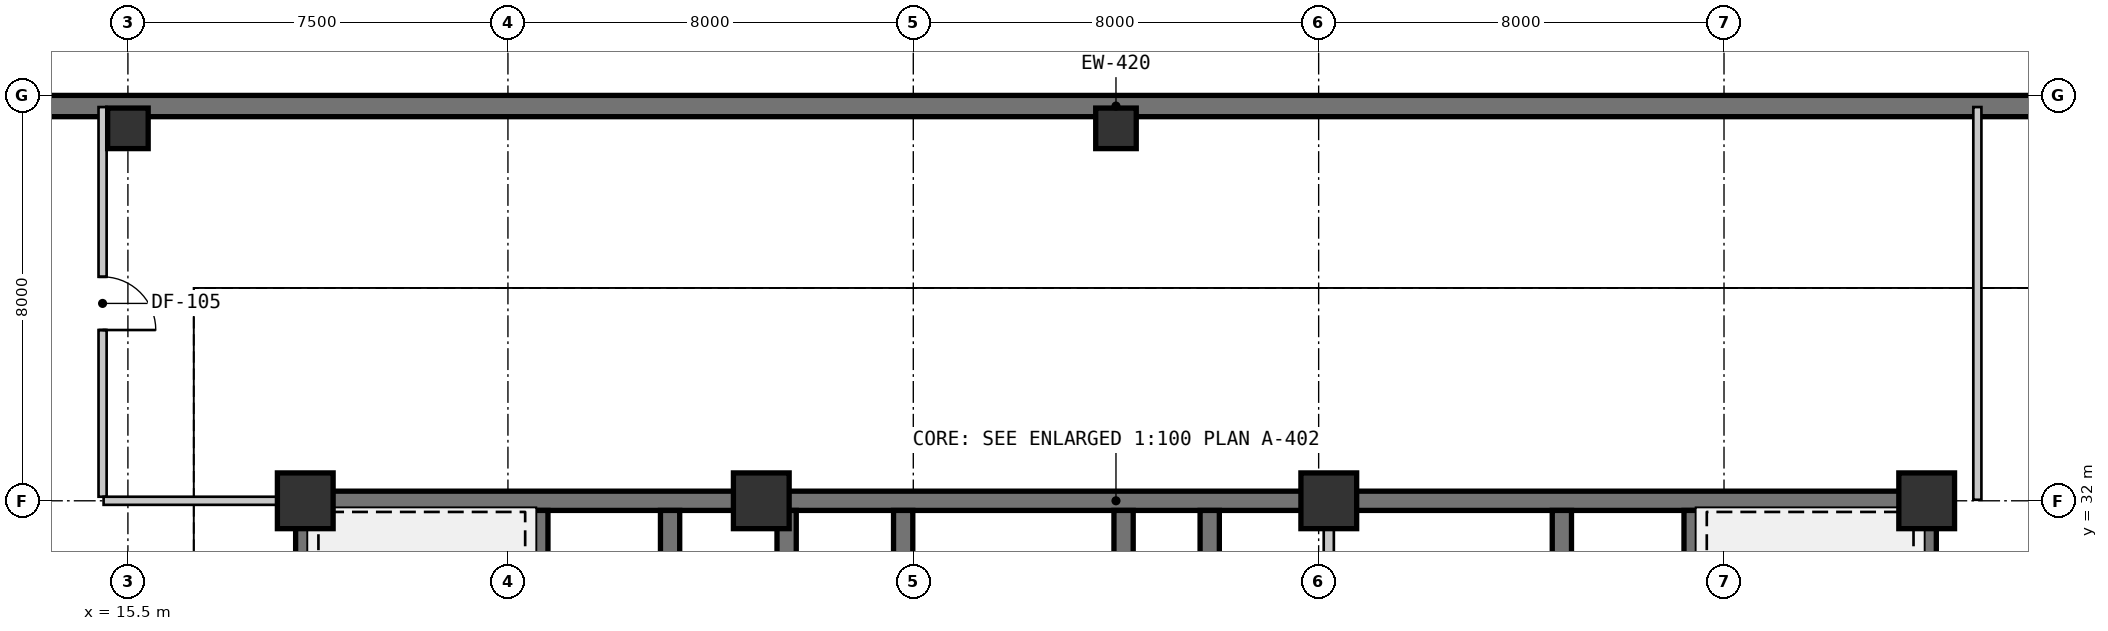
"""IFC4 building model, lengths in metres.
Left out: names, types, materials, properties, quantities, classifications, styles, units other than length and angle.
Written with IfcOpenShell. Run it as: python <this file> out.ifc"""

import sys

from ifc_helpers import new_model, si_unit, direction, frame, frame_2d, origin, origin_2d, place, context, subcontext, project, spatial, rectangle, extrude, source, transform, mapped, element, fill, save


model = new_model("IFC4")
c1 = context("Model", 3, precision=1e-05, world=origin(), true_north=direction((0.0, 1.0)))
c2 = subcontext(c1, "Body", "Model", "MODEL_VIEW")
j1 = project(units=[si_unit("LENGTHUNIT", "METRE"), si_unit("PLANEANGLEUNIT", "RADIAN")], contexts=[c1])
p1 = place(None, origin())
s1 = spatial("IfcSite", under=j1, at=p1, CompositionType="ELEMENT")
p2 = place(p1, origin())
s2 = spatial("IfcBuilding", under=s1, at=p2, CompositionType="ELEMENT")
p3 = place(p2, frame((0.0, 0.0, -8.0)))
s3 = spatial("IfcBuildingStorey", under=s2, at=p3, CompositionType="ELEMENT", Elevation=-8.0)
m1 = source(origin(), c2, "Body", "SweptSolid", [
    extrude(rectangle(XDim=1.1, YDim=1.1, at=origin_2d()), origin(), (0.0, 0.0, 1.0), 4.0),
])
for number, where, z_axis, x_axis in (
    (1, (19.0, 32.0, 0.0), (0.0, 0.0, 1.0), (1.0, 0.0, 0.0)),
    (2, (28.0, 32.0, 0.0), (0.0, 0.0, 1.0), (1.0, 0.0, 0.0)),
    (3, (39.2, 32.0, 0.0), (0.0, 0.0, 1.0), (1.0, 0.0, 0.0)),
    (4, (51.0, 32.0, 0.0), (0.0, 0.0, 1.0), (1.0, 0.0, 0.0)),
):
    element("IfcColumn", number, at=place(p3, frame(where, z_axis=z_axis, x_axis=x_axis)), inside=s3, PredefinedType="COLUMN", context=c2, shape_type="MappedRepresentation", body=[
        mapped(m1, transform((0.0, 0.0, 0.0), scale=1.0)),
    ])
m2 = source(origin(), c2, "Body", "SweptSolid", [
    extrude(rectangle(XDim=0.8, YDim=0.8, at=origin_2d()), origin(), (0.0, 0.0, 1.0), 4.0),
])
for number, where, z_axis, x_axis in (
    (5, (15.5, 39.35, 0.0), (0.0, 0.0, 1.0), (1.0, 0.0, 0.0)),
    (6, (35.0, 39.35, 0.0), (0.0, 0.0, 1.0), (1.0, 0.0, 0.0)),
):
    element("IfcColumn", number, at=place(p3, frame(where, z_axis=z_axis, x_axis=x_axis)), inside=s3, PredefinedType="COLUMN", context=c2, shape_type="MappedRepresentation", body=[
        mapped(m2, transform((0.0, 0.0, 0.0), scale=1.0)),
    ])
m3 = source(origin(), c2, "Body", "SweptSolid", [
    extrude(rectangle(XDim=69.58, YDim=0.42, at=frame_2d((34.79, 0.0))), origin(), (0.0, 0.0, 1.0), 3.72),
])
p4 = place(p3, frame((69.79, 39.79, 0.0), z_axis=(0.0, 0.0, 1.0), x_axis=(-1.0, 0.0, 0.0)))
e7 = element("IfcWall", 7, at=p4, inside=s3, PredefinedType="SOLIDWALL", context=c2, shape_type="MappedRepresentation", body=[
    mapped(m3, transform((0.0, 0.0, 0.0), scale=1.0)),
])
m4 = source(origin(), c2, "Body", "SweptSolid", [
    extrude(rectangle(XDim=9.19, YDim=0.38, at=frame_2d((4.595, 0.0))), origin(), (0.0, 0.0, 1.0), 3.72),
])
p5 = place(p3, frame((18.81, 32.0, 0.0), z_axis=(0.0, 0.0, 1.0), x_axis=(1.0, 0.0, 0.0)))
e8 = element("IfcWall", 8, at=p5, inside=s3, PredefinedType="SHEAR", context=c2, shape_type="MappedRepresentation", body=[
    mapped(m4, transform((0.0, 0.0, 0.0), scale=1.0)),
])
m5 = source(origin(), c2, "Body", "SweptSolid", [
    extrude(rectangle(XDim=11.2, YDim=0.38, at=frame_2d((5.6, 0.0))), origin(), (0.0, 0.0, 1.0), 3.72),
])
p6 = place(p3, frame((28.0, 32.0, 0.0), z_axis=(0.0, 0.0, 1.0), x_axis=(1.0, 0.0, 0.0)))
e9 = element("IfcWall", 9, at=p6, inside=s3, PredefinedType="SHEAR", context=c2, shape_type="MappedRepresentation", body=[
    mapped(m5, transform((0.0, 0.0, 0.0), scale=1.0)),
])
m6 = source(origin(), c2, "Body", "SweptSolid", [
    extrude(rectangle(XDim=11.99, YDim=0.38, at=frame_2d((5.995, 0.0))), origin(), (0.0, 0.0, 1.0), 3.72),
])
p7 = place(p3, frame((39.2, 32.0, 0.0), z_axis=(0.0, 0.0, 1.0), x_axis=(1.0, 0.0, 0.0)))
e10 = element("IfcWall", 10, at=p7, inside=s3, PredefinedType="SHEAR", context=c2, shape_type="MappedRepresentation", body=[
    mapped(m6, transform((0.0, 0.0, 0.0), scale=1.0)),
])
m7 = source(origin(), c2, "Body", "SweptSolid", [
    extrude(rectangle(XDim=3.61, YDim=0.38, at=frame_2d((1.805, 0.0))), origin(), (0.0, 0.0, 1.0), 3.72),
])
for number, where, z_axis, x_axis in (
    (11, (19.0, 28.2, 0.0), (0.0, 0.0, 1.0), (0.0, 1.0, 0.0)),
    (12, (51.0, 28.2, 0.0), (0.0, 0.0, 1.0), (0.0, 1.0, 0.0)),
):
    element("IfcWall", number, at=place(p3, frame(where, z_axis=z_axis, x_axis=x_axis)), inside=s3, PredefinedType="SHEAR", context=c2, shape_type="MappedRepresentation", body=[
        mapped(m7, transform((0.0, 0.0, 0.0), scale=1.0)),
    ])
m8 = source(origin(), c2, "Body", "SweptSolid", [
    extrude(rectangle(XDim=3.42, YDim=0.38, at=frame_2d((1.71, 0.0))), origin(), (0.0, 0.0, 1.0), 3.72),
])
for number, where, z_axis, x_axis in (
    (13, (23.6, 28.39, 0.0), (0.0, 0.0, 1.0), (0.0, 1.0, 0.0)),
    (14, (26.2, 28.39, 0.0), (0.0, 0.0, 1.0), (0.0, 1.0, 0.0)),
    (15, (46.4, 31.81, 0.0), (0.0, 0.0, 1.0), (0.0, -1.0, 0.0)),
    (16, (43.8, 31.81, 0.0), (0.0, 0.0, 1.0), (0.0, -1.0, 0.0)),
):
    element("IfcWall", number, at=place(p3, frame(where, z_axis=z_axis, x_axis=x_axis)), inside=s3, PredefinedType="SHEAR", context=c2, shape_type="MappedRepresentation", body=[
        mapped(m8, transform((0.0, 0.0, 0.0), scale=1.0)),
    ])
m9 = source(origin(), c2, "Body", "SweptSolid", [
    extrude(rectangle(XDim=1.12, YDim=0.38, at=frame_2d((0.56, 0.0))), origin(), (0.0, 0.0, 1.0), 3.72),
])
for number, where, z_axis, x_axis in (
    (17, (35.15, 31.81, 0.0), (0.0, 0.0, 1.0), (0.0, -1.0, 0.0)),
    (18, (36.85, 30.69, 0.0), (0.0, 0.0, 1.0), (0.0, 1.0, 0.0)),
):
    element("IfcWall", number, at=place(p3, frame(where, z_axis=z_axis, x_axis=x_axis)), inside=s3, PredefinedType="SHEAR", context=c2, shape_type="MappedRepresentation", body=[
        mapped(m9, transform((0.0, 0.0, 0.0), scale=1.0)),
    ])
for number, where, z_axis, x_axis in (
    (19, (28.5, 28.39, 0.0), (0.0, 0.0, 1.0), (0.0, 1.0, 0.0)),
    (20, (30.8, 28.39, 0.0), (0.0, 0.0, 1.0), (0.0, 1.0, 0.0)),
):
    element("IfcWall", number, at=place(p3, frame(where, z_axis=z_axis, x_axis=x_axis)), inside=s3, PredefinedType="SHEAR", context=c2, shape_type="MappedRepresentation", body=[
        mapped(m8, transform((0.0, 0.0, 0.0), scale=1.0)),
    ])
m10 = source(origin(), c2, "Body", "SweptSolid", [
    extrude(rectangle(XDim=7.71, YDim=0.2, at=frame_2d((3.855, 0.0))), origin(), (0.0, 0.0, 1.0), 3.26),
])
p8 = place(p3, frame((39.2, 31.81, 0.0), z_axis=(0.0, 0.0, 1.0), x_axis=(0.0, -1.0, 0.0)))
e21 = element("IfcWall", 21, at=p8, inside=s3, PredefinedType="SOLIDWALL", context=c2, shape_type="MappedRepresentation", body=[
    mapped(m10, transform((0.0, 0.0, 0.0), scale=1.0)),
])
m11 = source(origin(), c2, "Body", "SweptSolid", [
    extrude(rectangle(XDim=7.69, YDim=0.16, at=frame_2d((3.845, 0.0))), origin(), (0.0, 0.0, 1.0), 3.72),
])
p9 = place(p3, frame((15.0, 39.77, 0.0), z_axis=(0.0, 0.0, 1.0), x_axis=(0.0, -1.0, 0.0)))
e22 = element("IfcWall", 22, at=p9, inside=s3, PredefinedType="PARTITIONING", context=c2, shape_type="MappedRepresentation", body=[
    mapped(m11, transform((0.0, 0.0, 0.0), scale=1.0)),
])
m12 = source(origin(), c2, "Body", "SweptSolid", [
    extrude(rectangle(XDim=1.05, YDim=2.1, at=frame_2d((0.525, 1.05))), frame((0.0, 0.09, 0.0), z_axis=(0.0, -1.0, 0.0), x_axis=(1.0, 0.0, 0.0)), (0.0, 0.0, 1.0), 0.18),
])
p10 = place(p9, frame((3.35, 0.0, 0.0)))
e23 = element("IfcOpeningElement", 23, at=p10, cuts=e22, PredefinedType="OPENING", context=c2, shape_type="MappedRepresentation", body=[
    mapped(m12, transform((0.0, 0.0, 0.0), scale=1.0)),
])
m13 = source(origin(), c2, "Body", "SweptSolid", [
    extrude(rectangle(XDim=3.79, YDim=0.16, at=frame_2d((1.895, 0.0))), origin(), (0.0, 0.0, 1.0), 3.187),
])
p11 = place(p3, frame((15.02, 32.0, 0.0), z_axis=(0.0, 0.0, 1.0), x_axis=(1.0, 0.0, 0.0)))
e24 = element("IfcWall", 24, at=p11, inside=s3, PredefinedType="PARTITIONING", context=c2, shape_type="MappedRepresentation", body=[
    mapped(m13, transform((0.0, 0.0, 0.0), scale=1.0)),
])
m14 = source(origin(), c2, "Body", "SweptSolid", [
    extrude(rectangle(XDim=7.75, YDim=0.16, at=frame_2d((3.875, 0.0))), origin(), (0.0, 0.0, 1.0), 3.72),
])
p12 = place(p3, frame((52.0, 32.02, 0.0), z_axis=(0.0, 0.0, 1.0), x_axis=(0.0, 1.0, 0.0)))
e25 = element("IfcWall", 25, at=p12, inside=s3, PredefinedType="PARTITIONING", context=c2, shape_type="MappedRepresentation", body=[
    mapped(m14, transform((0.0, 0.0, 0.0), scale=1.0)),
])
m15 = source(origin(), c2, "Body", "SweptSolid", [
    extrude(rectangle(XDim=1.05, YDim=2.1, at=frame_2d((0.525, 1.05))), frame((0.0, 0.025, 0.0), z_axis=(0.0, -1.0, 0.0), x_axis=(1.0, 0.0, 0.0)), (0.0, 0.0, 1.0), 0.05),
])
p13 = place(p10, origin())
e26 = element("IfcDoor", 26, at=p13, inside=s3, OperationType="SINGLE_SWING_RIGHT", PredefinedType="DOOR", context=c2, shape_type="MappedRepresentation", body=[
    mapped(m15, transform((0.0, 0.0, 0.0), scale=1.0)),
])
fill(e23, e26)
save(model, sys.argv[1])
